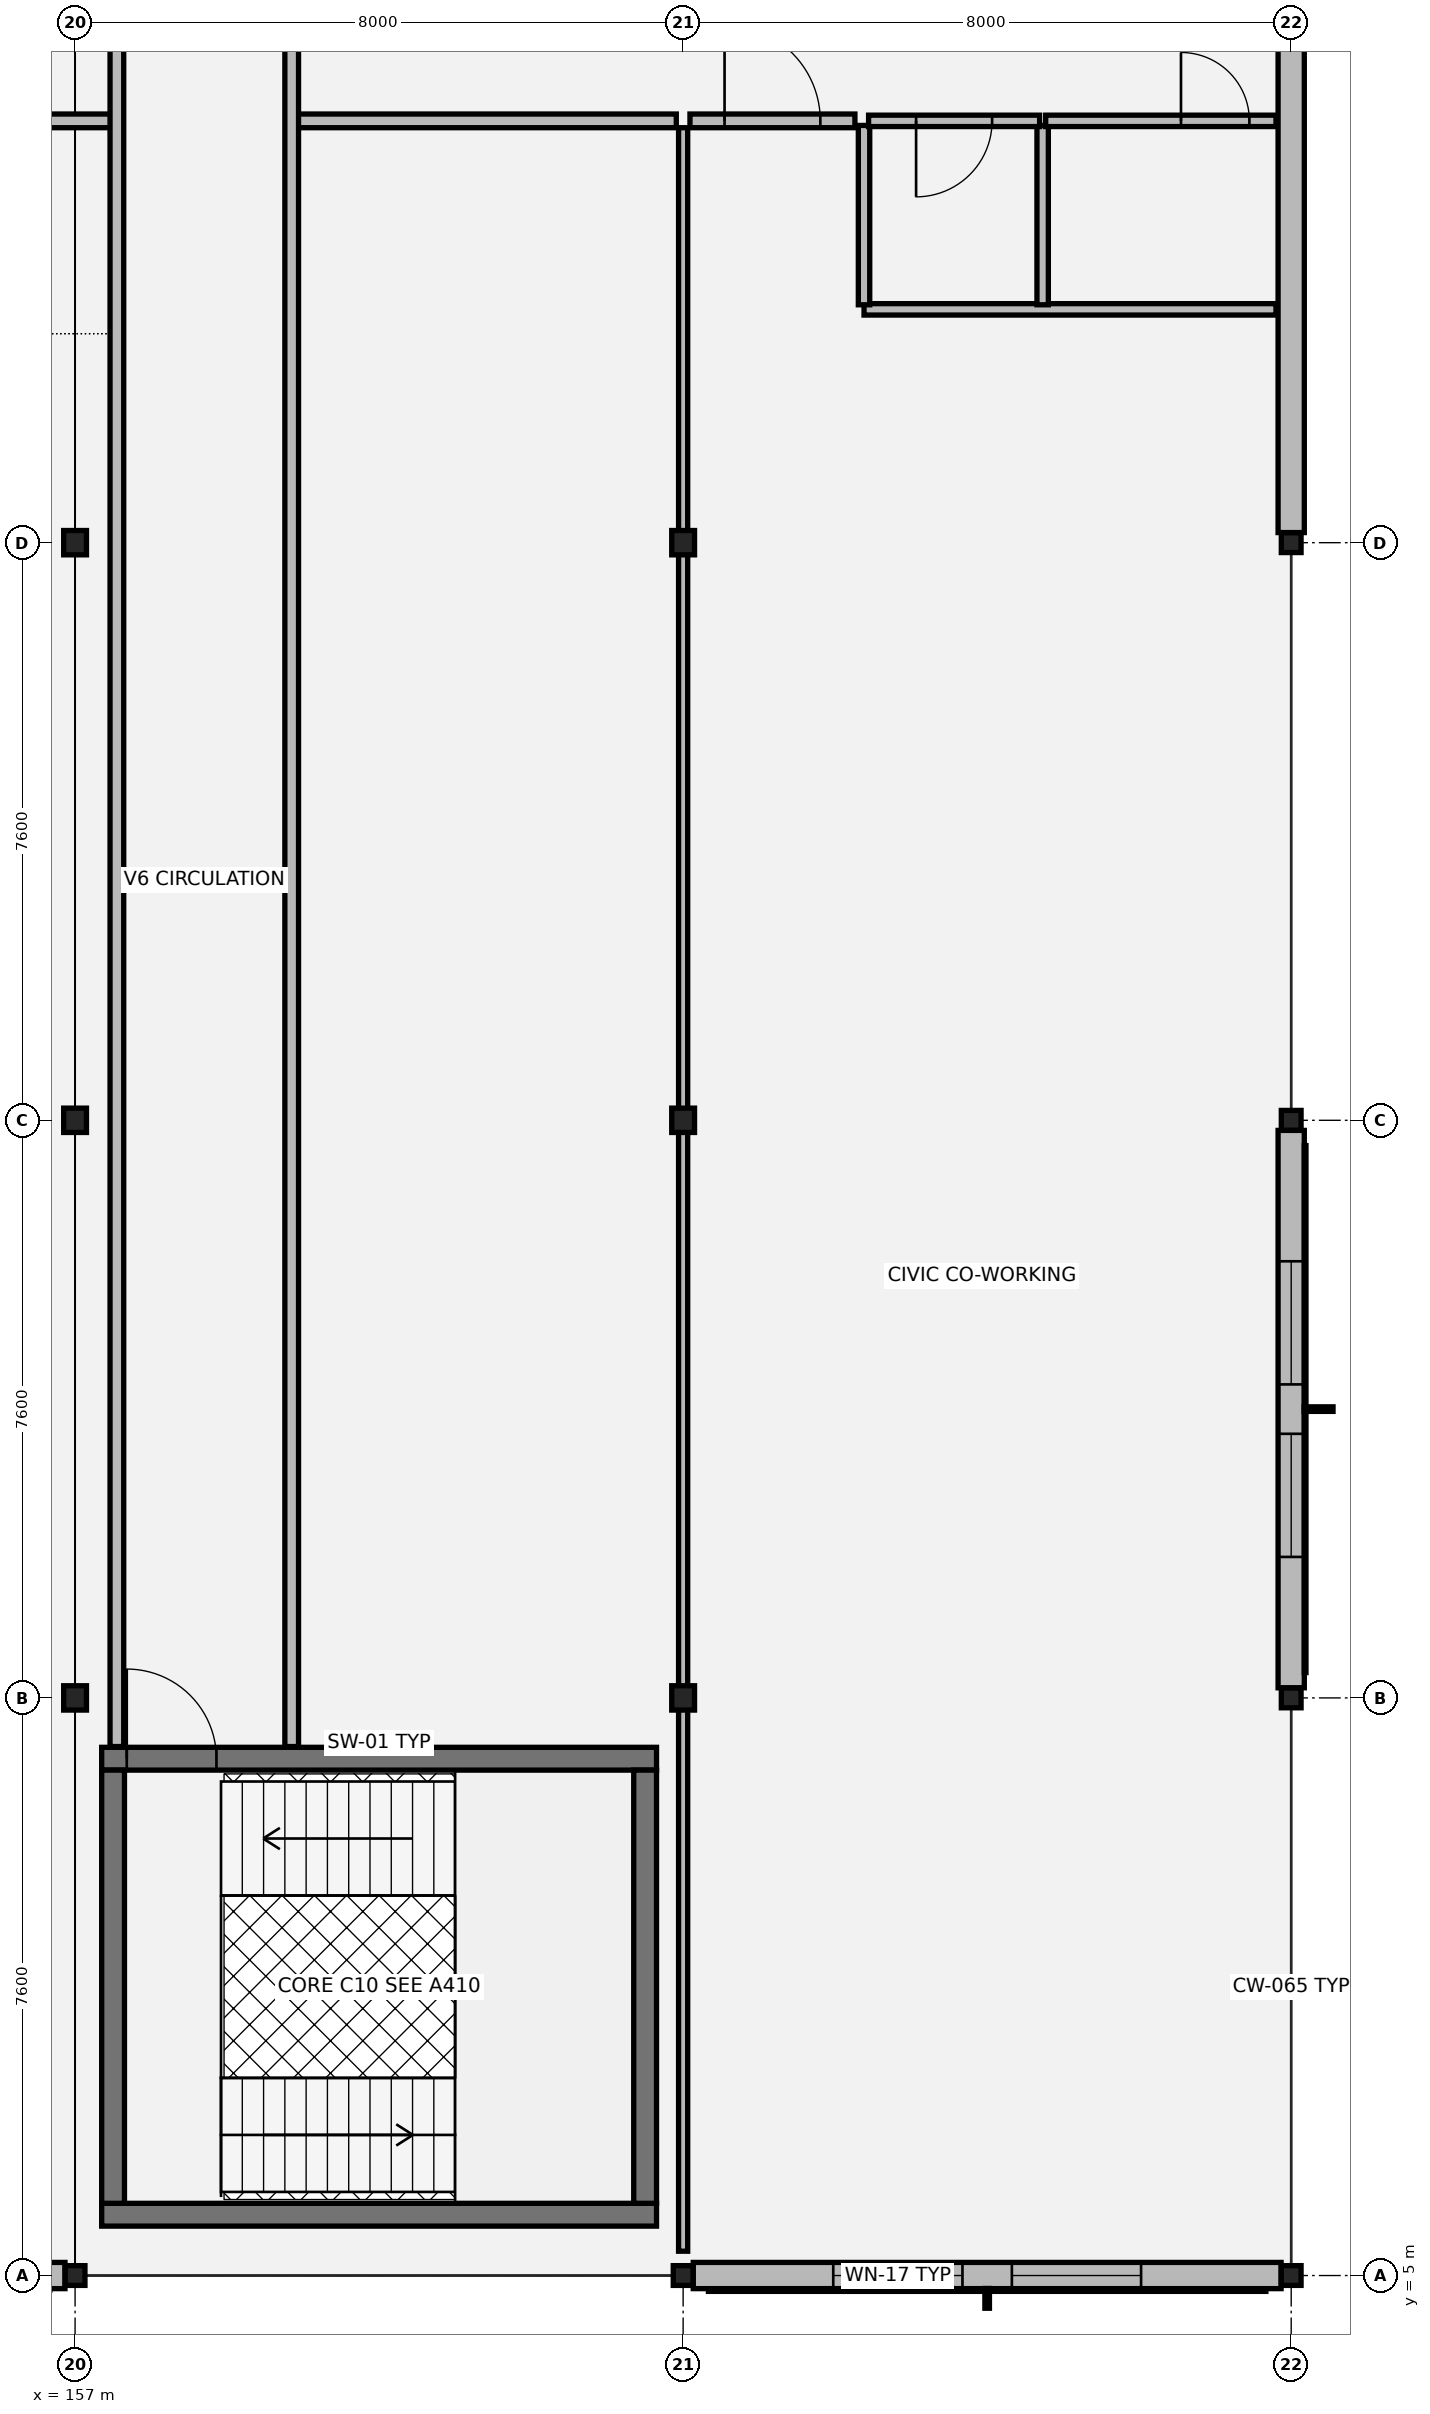
"""IFC4 building model, lengths in metres.
Left out: names, types, materials, properties, quantities, classifications, styles, units other than length and angle.
Written with IfcOpenShell. Run it as: python <this file> out.ifc"""

import sys

from ifc_helpers import new_model, si_unit, direction, frame, frame_2d, origin, origin_2d, place, context, subcontext, project, spatial, rectangle, hollow_rectangle, i_section, extrude, element, fill, save


model = new_model("IFC4")
c1 = context("Model", 3, precision=1e-05, world=origin(), true_north=direction((0.0, 1.0)))
c2 = subcontext(c1, "Body", "Model", "MODEL_VIEW")
j1 = project(units=[si_unit("LENGTHUNIT", "METRE"), si_unit("PLANEANGLEUNIT", "RADIAN")], contexts=[c1])
p1 = place(None, origin())
s1 = spatial("IfcSite", under=j1, at=p1, CompositionType="ELEMENT")
p2 = place(p1, origin())
s2 = spatial("IfcBuilding", under=s1, at=p2, CompositionType="ELEMENT")
p3 = place(p2, frame((0.0, 0.0, 9.18)))
s3 = spatial("IfcBuildingStorey", under=s2, at=p3, CompositionType="ELEMENT", Elevation=9.18)
p4 = place(p3, frame((157.0, 5.0, 0.0), z_axis=(0.0, 0.0, 1.0), x_axis=(1.0, 0.0, 0.0)))
e1 = element("IfcColumn", 1, at=p4, inside=s3, PredefinedType="COLUMN", context=c2, shape_type="SweptSolid", body=[
    extrude(hollow_rectangle(XDim=0.26, YDim=0.26, WallThickness=0.012, at=origin_2d()), origin(), (0.0, 0.0, 1.0), 4.055),
])
for number, where, z_axis, x_axis in (
    (2, (157.0, 12.6, 0.0), (0.0, 0.0, 1.0), (1.0, 0.0, 0.0)),
    (3, (157.0, 20.2, 0.0), (0.0, 0.0, 1.0), (1.0, 0.0, 0.0)),
    (4, (157.0, 27.8, 0.0), (0.0, 0.0, 1.0), (1.0, 0.0, 0.0)),
):
    element("IfcColumn", number, at=place(p3, frame(where, z_axis=z_axis, x_axis=x_axis)), inside=s3, PredefinedType="COLUMN", context=c2, shape_type="SweptSolid", body=[
        extrude(i_section(OverallWidth=0.3, OverallDepth=0.32, WebThickness=0.011, FlangeThickness=0.021, at=origin_2d()), origin(), (0.0, 0.0, 1.0), 4.055),
    ])
p5 = place(p3, frame((165.0, 5.0, 0.0), z_axis=(0.0, 0.0, 1.0), x_axis=(1.0, 0.0, 0.0)))
e5 = element("IfcColumn", 5, at=p5, inside=s3, PredefinedType="COLUMN", context=c2, shape_type="SweptSolid", body=[
    extrude(hollow_rectangle(XDim=0.26, YDim=0.26, WallThickness=0.012, at=origin_2d()), origin(), (0.0, 0.0, 1.0), 4.055),
])
for number, where, z_axis, x_axis in (
    (6, (165.0, 12.6, 0.0), (0.0, 0.0, 1.0), (1.0, 0.0, 0.0)),
    (7, (165.0, 20.2, 0.0), (0.0, 0.0, 1.0), (1.0, 0.0, 0.0)),
    (8, (165.0, 27.8, 0.0), (0.0, 0.0, 1.0), (1.0, 0.0, 0.0)),
):
    element("IfcColumn", number, at=place(p3, frame(where, z_axis=z_axis, x_axis=x_axis)), inside=s3, PredefinedType="COLUMN", context=c2, shape_type="SweptSolid", body=[
        extrude(i_section(OverallWidth=0.3, OverallDepth=0.32, WebThickness=0.011, FlangeThickness=0.021, at=origin_2d()), origin(), (0.0, 0.0, 1.0), 4.055),
    ])
for number, where, z_axis, x_axis in (
    (9, (173.0, 5.0, 0.0), (0.0, 0.0, 1.0), (1.0, 0.0, 0.0)),
    (10, (173.0, 12.6, 0.0), (0.0, 0.0, 1.0), (1.0, 0.0, 0.0)),
    (11, (173.0, 20.2, 0.0), (0.0, 0.0, 1.0), (1.0, 0.0, 0.0)),
    (12, (173.0, 27.8, 0.0), (0.0, 0.0, 1.0), (1.0, 0.0, 0.0)),
):
    element("IfcColumn", number, at=place(p3, frame(where, z_axis=z_axis, x_axis=x_axis)), inside=s3, PredefinedType="COLUMN", context=c2, shape_type="SweptSolid", body=[
        extrude(hollow_rectangle(XDim=0.26, YDim=0.26, WallThickness=0.012, at=origin_2d()), origin(), (0.0, 0.0, 1.0), 4.055),
    ])
p6 = place(p3, frame((149.133, 5.0, 0.0), z_axis=(0.0, 0.0, 1.0), x_axis=(1.0, 0.0, 0.0)))
e13 = element("IfcWall", 13, at=p6, inside=s3, PredefinedType="SOLIDWALL", context=c2, shape_type="SweptSolid", body=[
    extrude(rectangle(XDim=7.734, YDim=0.345, at=frame_2d((3.867, 0.0))), origin(), (0.0, 0.0, 1.0), 3.48),
])
p7 = place(p6, frame((1.922, 0.0, 0.8)))
e14 = element("IfcOpeningElement", 14, at=p7, cuts=e13, PredefinedType="OPENING", context=c2, shape_type="SweptSolid", body=[
    extrude(rectangle(XDim=1.62, YDim=2.06, at=frame_2d((0.81, 1.03))), frame((0.0, 0.182, 0.0), z_axis=(0.0, -1.0, 0.0), x_axis=(1.0, 0.0, 0.0)), (0.0, 0.0, 1.0), 0.365),
])
p8 = place(p6, frame((4.192, 0.0, 0.8)))
e15 = element("IfcOpeningElement", 15, at=p8, cuts=e13, PredefinedType="OPENING", context=c2, shape_type="SweptSolid", body=[
    extrude(rectangle(XDim=1.62, YDim=2.06, at=frame_2d((0.81, 1.03))), frame((0.0, 0.182, 0.0), z_axis=(0.0, -1.0, 0.0), x_axis=(1.0, 0.0, 0.0)), (0.0, 0.0, 1.0), 0.365),
])
p9 = place(p3, frame((165.133, 5.0, 0.0), z_axis=(0.0, 0.0, 1.0), x_axis=(1.0, 0.0, 0.0)))
e16 = element("IfcWall", 16, at=p9, inside=s3, PredefinedType="SOLIDWALL", context=c2, shape_type="SweptSolid", body=[
    extrude(rectangle(XDim=7.734, YDim=0.345, at=frame_2d((3.867, 0.0))), origin(), (0.0, 0.0, 1.0), 3.48),
])
p10 = place(p9, frame((1.842, 0.0, 0.8)))
e17 = element("IfcOpeningElement", 17, at=p10, cuts=e16, PredefinedType="OPENING", context=c2, shape_type="SweptSolid", body=[
    extrude(rectangle(XDim=1.7, YDim=2.2, at=frame_2d((0.85, 1.1))), frame((0.0, 0.182, 0.0), z_axis=(0.0, -1.0, 0.0), x_axis=(1.0, 0.0, 0.0)), (0.0, 0.0, 1.0), 0.365),
])
p11 = place(p9, frame((4.192, 0.0, 0.8)))
e18 = element("IfcOpeningElement", 18, at=p11, cuts=e16, PredefinedType="OPENING", context=c2, shape_type="SweptSolid", body=[
    extrude(rectangle(XDim=1.7, YDim=2.2, at=frame_2d((0.85, 1.1))), frame((0.0, 0.182, 0.0), z_axis=(0.0, -1.0, 0.0), x_axis=(1.0, 0.0, 0.0)), (0.0, 0.0, 1.0), 0.365),
])
p12 = place(p3, frame((173.0, 12.733, 0.0), z_axis=(0.0, 0.0, 1.0), x_axis=(0.0, 1.0, 0.0)))
e19 = element("IfcWall", 19, at=p12, inside=s3, PredefinedType="SOLIDWALL", context=c2, shape_type="SweptSolid", body=[
    extrude(rectangle(XDim=7.334, YDim=0.345, at=frame_2d((3.667, 0.0))), origin(), (0.0, 0.0, 1.0), 3.48),
])
p13 = place(p12, frame((1.722, 0.0, 0.8)))
e20 = element("IfcOpeningElement", 20, at=p13, cuts=e19, PredefinedType="OPENING", context=c2, shape_type="SweptSolid", body=[
    extrude(rectangle(XDim=1.62, YDim=2.06, at=frame_2d((0.81, 1.03))), frame((0.0, 0.182, 0.0), z_axis=(0.0, -1.0, 0.0), x_axis=(1.0, 0.0, 0.0)), (0.0, 0.0, 1.0), 0.365),
])
p14 = place(p12, frame((3.992, 0.0, 0.8)))
e21 = element("IfcOpeningElement", 21, at=p14, cuts=e19, PredefinedType="OPENING", context=c2, shape_type="SweptSolid", body=[
    extrude(rectangle(XDim=1.62, YDim=2.06, at=frame_2d((0.81, 1.03))), frame((0.0, 0.182, 0.0), z_axis=(0.0, -1.0, 0.0), x_axis=(1.0, 0.0, 0.0)), (0.0, 0.0, 1.0), 0.365),
])
p15 = place(p3, frame((173.0, 27.933, 0.0), z_axis=(0.0, 0.0, 1.0), x_axis=(0.0, 1.0, 0.0)))
e22 = element("IfcWall", 22, at=p15, inside=s3, PredefinedType="SOLIDWALL", context=c2, shape_type="SweptSolid", body=[
    extrude(rectangle(XDim=7.334, YDim=0.345, at=frame_2d((3.667, 0.0))), origin(), (0.0, 0.0, 1.0), 3.48),
])
p16 = place(p3, frame((157.35, 5.8, 0.0), z_axis=(0.0, 0.0, 1.0), x_axis=(1.0, 0.0, 0.0)))
e23 = element("IfcWall", 23, at=p16, inside=s3, PredefinedType="SHEAR", context=c2, shape_type="SweptSolid", body=[
    extrude(rectangle(XDim=7.3, YDim=0.3, at=frame_2d((3.65, 0.0))), origin(), (0.0, 0.0, 1.0), 3.845),
])
p17 = place(p3, frame((157.35, 11.8, 0.0), z_axis=(0.0, 0.0, 1.0), x_axis=(1.0, 0.0, 0.0)))
e24 = element("IfcWall", 24, at=p17, inside=s3, PredefinedType="SHEAR", context=c2, shape_type="SweptSolid", body=[
    extrude(rectangle(XDim=7.3, YDim=0.3, at=frame_2d((3.65, 0.0))), origin(), (0.0, 0.0, 1.0), 3.845),
])
p18 = place(p17, frame((0.33, 0.0, 0.0)))
e25 = element("IfcOpeningElement", 25, at=p18, cuts=e24, PredefinedType="OPENING", context=c2, shape_type="SweptSolid", body=[
    extrude(rectangle(XDim=1.18, YDim=2.18, at=frame_2d((0.59, 1.09))), frame((0.0, 0.16, 0.0), z_axis=(0.0, -1.0, 0.0), x_axis=(1.0, 0.0, 0.0)), (0.0, 0.0, 1.0), 0.32),
])
for number, where, z_axis, x_axis in (
    (26, (157.5, 5.95, 0.0), (0.0, 0.0, 1.0), (0.0, 1.0, 0.0)),
    (27, (164.5, 5.95, 0.0), (0.0, 0.0, 1.0), (0.0, 1.0, 0.0)),
):
    element("IfcWall", number, at=place(p3, frame(where, z_axis=z_axis, x_axis=x_axis)), inside=s3, PredefinedType="SHEAR", context=c2, shape_type="SweptSolid", body=[
        extrude(rectangle(XDim=5.7, YDim=0.3, at=frame_2d((2.85, 0.0))), origin(), (0.0, 0.0, 1.0), 3.845),
    ])
p19 = place(p3, frame((167.38, 30.87, 0.0), z_axis=(0.0, 0.0, 1.0), x_axis=(1.0, 0.0, 0.0)))
e28 = element("IfcWall", 28, at=p19, inside=s3, PredefinedType="PARTITIONING", context=c2, shape_type="SweptSolid", body=[
    extrude(rectangle(XDim=5.42, YDim=0.15, at=frame_2d((2.71, 0.0))), origin(), (0.0, 0.0, 1.0), 3.18),
])
for number, where, z_axis, x_axis in (
    (29, (167.38, 30.93, 0.0), (0.0, 0.0, 1.0), (0.0, 1.0, 0.0)),
    (30, (169.73, 30.93, 0.0), (0.0, 0.0, 1.0), (0.0, 1.0, 0.0)),
):
    element("IfcWall", number, at=place(p3, frame(where, z_axis=z_axis, x_axis=x_axis)), inside=s3, PredefinedType="PARTITIONING", context=c2, shape_type="SweptSolid", body=[
        extrude(rectangle(XDim=2.36, YDim=0.15, at=frame_2d((1.18, 0.0))), origin(), (0.0, 0.0, 1.0), 3.18),
    ])
p20 = place(p3, frame((167.44, 33.35, 0.0), z_axis=(0.0, 0.0, 1.0), x_axis=(1.0, 0.0, 0.0)))
e31 = element("IfcWall", 31, at=p20, inside=s3, PredefinedType="PARTITIONING", context=c2, shape_type="SweptSolid", body=[
    extrude(rectangle(XDim=2.25, YDim=0.15, at=frame_2d((1.125, 0.0))), origin(), (0.0, 0.0, 1.0), 3.18),
])
p21 = place(p20, frame((0.625, 0.0, 0.0)))
e32 = element("IfcOpeningElement", 32, at=p21, cuts=e31, PredefinedType="OPENING", context=c2, shape_type="SweptSolid", body=[
    extrude(rectangle(XDim=1.0, YDim=2.15, at=frame_2d((0.5, 1.075))), frame((0.0, 0.085, 0.0), z_axis=(0.0, -1.0, 0.0), x_axis=(1.0, 0.0, 0.0)), (0.0, 0.0, 1.0), 0.17),
])
p22 = place(p3, frame((169.77, 33.35, 0.0), z_axis=(0.0, 0.0, 1.0), x_axis=(1.0, 0.0, 0.0)))
e33 = element("IfcWall", 33, at=p22, inside=s3, PredefinedType="PARTITIONING", context=c2, shape_type="SweptSolid", body=[
    extrude(rectangle(XDim=3.03, YDim=0.15, at=frame_2d((1.515, 0.0))), origin(), (0.0, 0.0, 1.0), 3.18),
])
p23 = place(p22, frame((1.78, 0.0, 0.0)))
e34 = element("IfcOpeningElement", 34, at=p23, cuts=e33, PredefinedType="OPENING", context=c2, shape_type="SweptSolid", body=[
    extrude(rectangle(XDim=0.9, YDim=2.15, at=frame_2d((0.45, 1.075))), frame((0.0, 0.085, 0.0), z_axis=(0.0, -1.0, 0.0), x_axis=(1.0, 0.0, 0.0)), (0.0, 0.0, 1.0), 0.17),
])
p24 = place(p3, frame((149.09, 33.35, 0.0), z_axis=(0.0, 0.0, 1.0), x_axis=(1.0, 0.0, 0.0)))
e35 = element("IfcWall", 35, at=p24, inside=s3, PredefinedType="PARTITIONING", context=c2, shape_type="SweptSolid", body=[
    extrude(rectangle(XDim=8.46, YDim=0.18, at=frame_2d((4.23, 0.0))), origin(), (0.0, 0.0, 1.0), 3.18),
])
p25 = place(p24, frame((3.53, 0.0, 0.0)))
e36 = element("IfcOpeningElement", 36, at=p25, cuts=e35, PredefinedType="OPENING", context=c2, shape_type="SweptSolid", body=[
    extrude(rectangle(XDim=1.4, YDim=2.22, at=frame_2d((0.7, 1.11))), frame((0.0, 0.1, 0.0), z_axis=(0.0, -1.0, 0.0), x_axis=(1.0, 0.0, 0.0)), (0.0, 0.0, 1.0), 0.2),
])
p26 = place(p3, frame((159.85, 33.35, 0.0), z_axis=(0.0, 0.0, 1.0), x_axis=(1.0, 0.0, 0.0)))
e37 = element("IfcWall", 37, at=p26, inside=s3, PredefinedType="PARTITIONING", context=c2, shape_type="SweptSolid", body=[
    extrude(rectangle(XDim=5.06, YDim=0.18, at=frame_2d((2.53, 0.0))), origin(), (0.0, 0.0, 1.0), 3.18),
])
p27 = place(p3, frame((165.09, 33.35, 0.0), z_axis=(0.0, 0.0, 1.0), x_axis=(1.0, 0.0, 0.0)))
e38 = element("IfcWall", 38, at=p27, inside=s3, PredefinedType="PARTITIONING", context=c2, shape_type="SweptSolid", body=[
    extrude(rectangle(XDim=2.17, YDim=0.18, at=frame_2d((1.085, 0.0))), origin(), (0.0, 0.0, 1.0), 3.18),
])
p28 = place(p27, frame((0.455, 0.0, 0.0)))
e39 = element("IfcOpeningElement", 39, at=p28, cuts=e38, PredefinedType="OPENING", context=c2, shape_type="SweptSolid", body=[
    extrude(rectangle(XDim=1.26, YDim=2.2, at=frame_2d((0.63, 1.1))), frame((0.0, 0.1, 0.0), z_axis=(0.0, -1.0, 0.0), x_axis=(1.0, 0.0, 0.0)), (0.0, 0.0, 1.0), 0.2),
])
for number, where, z_axis, x_axis in (
    (40, (157.55, 11.96, 0.0), (0.0, 0.0, 1.0), (0.0, 1.0, 0.0)),
    (41, (159.85, 11.96, 0.0), (0.0, 0.0, 1.0), (0.0, 1.0, 0.0)),
):
    element("IfcWall", number, at=place(p3, frame(where, z_axis=z_axis, x_axis=x_axis)), inside=s3, PredefinedType="PARTITIONING", context=c2, shape_type="SweptSolid", body=[
        extrude(rectangle(XDim=24.08, YDim=0.18, at=frame_2d((12.04, 0.0))), origin(), (0.0, 0.0, 1.0), 3.18),
    ])
p29 = place(p3, frame((165.0, 5.32, 0.0), z_axis=(0.0, 0.0, 1.0), x_axis=(0.0, 1.0, 0.0)))
e42 = element("IfcWall", 42, at=p29, inside=s3, PredefinedType="PARTITIONING", context=c2, shape_type="SweptSolid", body=[
    extrude(rectangle(XDim=27.94, YDim=0.12, at=frame_2d((13.97, 0.0))), origin(), (0.0, 0.0, 1.0), 3.18),
])
p30 = place(p10, origin())
e43 = element("IfcWindow", 43, at=p30, inside=s3, PartitioningType="SINGLE_PANEL", PredefinedType="WINDOW", context=c2, shape_type="SweptSolid", body=[
    extrude(rectangle(XDim=1.7, YDim=2.2, at=frame_2d((0.85, 1.1))), frame((0.0, 0.03, 0.0), z_axis=(0.0, -1.0, 0.0), x_axis=(1.0, 0.0, 0.0)), (0.0, 0.0, 1.0), 0.06),
])
fill(e17, e43)
p31 = place(p11, origin())
e44 = element("IfcWindow", 44, at=p31, inside=s3, PartitioningType="SINGLE_PANEL", PredefinedType="WINDOW", context=c2, shape_type="SweptSolid", body=[
    extrude(rectangle(XDim=1.7, YDim=2.2, at=frame_2d((0.85, 1.1))), frame((0.0, 0.03, 0.0), z_axis=(0.0, -1.0, 0.0), x_axis=(1.0, 0.0, 0.0)), (0.0, 0.0, 1.0), 0.06),
])
fill(e18, e44)
p32 = place(p13, origin())
e45 = element("IfcWindow", 45, at=p32, inside=s3, PartitioningType="SINGLE_PANEL", PredefinedType="WINDOW", context=c2, shape_type="SweptSolid", body=[
    extrude(rectangle(XDim=1.62, YDim=2.06, at=frame_2d((0.81, 1.03))), frame((0.0, 0.03, 0.0), z_axis=(0.0, -1.0, 0.0), x_axis=(1.0, 0.0, 0.0)), (0.0, 0.0, 1.0), 0.06),
])
fill(e20, e45)
p33 = place(p14, origin())
e46 = element("IfcWindow", 46, at=p33, inside=s3, PartitioningType="SINGLE_PANEL", PredefinedType="WINDOW", context=c2, shape_type="SweptSolid", body=[
    extrude(rectangle(XDim=1.62, YDim=2.06, at=frame_2d((0.81, 1.03))), frame((0.0, 0.03, 0.0), z_axis=(0.0, -1.0, 0.0), x_axis=(1.0, 0.0, 0.0)), (0.0, 0.0, 1.0), 0.06),
])
fill(e21, e46)
p34 = place(p18, origin())
e47 = element("IfcDoor", 47, at=p34, inside=s3, OperationType="SINGLE_SWING_LEFT", PredefinedType="DOOR", context=c2, shape_type="SweptSolid", body=[
    extrude(rectangle(XDim=1.18, YDim=2.18, at=frame_2d((0.59, 1.09))), frame((0.0, 0.025, 0.0), z_axis=(0.0, -1.0, 0.0), x_axis=(1.0, 0.0, 0.0)), (0.0, 0.0, 1.0), 0.05),
])
fill(e25, e47)
p35 = place(p21, origin())
e48 = element("IfcDoor", 48, at=p35, inside=s3, OperationType="SINGLE_SWING_RIGHT", PredefinedType="DOOR", context=c2, shape_type="SweptSolid", body=[
    extrude(rectangle(XDim=1.0, YDim=2.15, at=frame_2d((0.5, 1.075))), frame((0.0, 0.025, 0.0), z_axis=(0.0, -1.0, 0.0), x_axis=(1.0, 0.0, 0.0)), (0.0, 0.0, 1.0), 0.05),
])
fill(e32, e48)
p36 = place(p23, origin())
e49 = element("IfcDoor", 49, at=p36, inside=s3, OperationType="SINGLE_SWING_LEFT", PredefinedType="DOOR", context=c2, shape_type="SweptSolid", body=[
    extrude(rectangle(XDim=0.9, YDim=2.15, at=frame_2d((0.45, 1.075))), frame((0.0, 0.025, 0.0), z_axis=(0.0, -1.0, 0.0), x_axis=(1.0, 0.0, 0.0)), (0.0, 0.0, 1.0), 0.05),
])
fill(e34, e49)
p37 = place(p28, origin())
e50 = element("IfcDoor", 50, at=p37, inside=s3, OperationType="SINGLE_SWING_LEFT", PredefinedType="DOOR", context=c2, shape_type="SweptSolid", body=[
    extrude(rectangle(XDim=1.26, YDim=2.2, at=frame_2d((0.63, 1.1))), frame((0.0, 0.025, 0.0), z_axis=(0.0, -1.0, 0.0), x_axis=(1.0, 0.0, 0.0)), (0.0, 0.0, 1.0), 0.05),
])
fill(e39, e50)
save(model, sys.argv[1])
